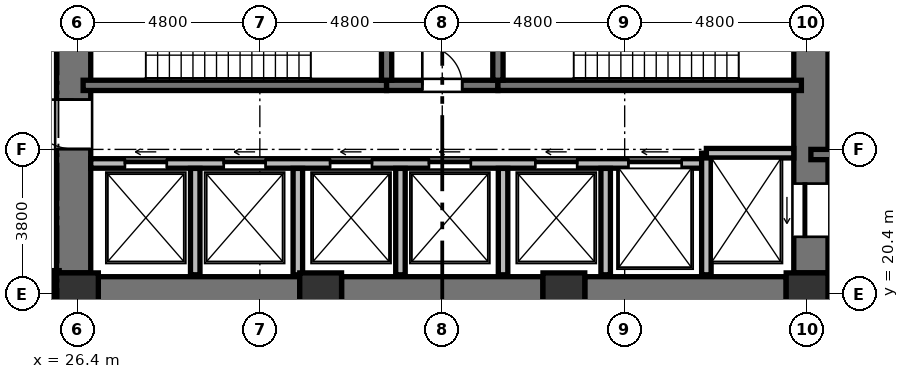
"""IFC4 building model, lengths in metres.
Left out: names, types, materials, properties, quantities, classifications, styles, units other than length and angle.
Written with IfcOpenShell. Run it as: python <this file> out.ifc"""

import sys

from ifc_helpers import new_model, si_unit, direction, frame, frame_2d, origin, origin_2d, place, context, subcontext, project, spatial, rectangle, extrude, element, fill, save


model = new_model("IFC4")
c1 = context("Model", 3, precision=1e-05, world=origin(), true_north=direction((0.0, 1.0)))
c2 = subcontext(c1, "Body", "Model", "MODEL_VIEW")
j1 = project(units=[si_unit("LENGTHUNIT", "METRE"), si_unit("PLANEANGLEUNIT", "RADIAN")], contexts=[c1])
p1 = place(None, origin())
s1 = spatial("IfcSite", under=j1, at=p1, CompositionType="ELEMENT")
p2 = place(p1, origin())
s2 = spatial("IfcBuilding", under=s1, at=p2, CompositionType="ELEMENT")
p3 = place(p2, frame((0.0, 0.0, 6.0)))
s3 = spatial("IfcBuildingStorey", under=s2, at=p3, CompositionType="ELEMENT", Elevation=6.0)
for number, where, z_axis, x_axis in (
    (1, (26.4, 20.4, 0.0), (0.0, 0.0, 1.0), (1.0, 0.0, 0.0)),
    (2, (32.8, 20.4, 0.0), (0.0, 0.0, 1.0), (1.0, 0.0, 0.0)),
    (3, (39.2, 20.4, 0.0), (0.0, 0.0, 1.0), (1.0, 0.0, 0.0)),
    (4, (45.6, 20.4, 0.0), (0.0, 0.0, 1.0), (1.0, 0.0, 0.0)),
):
    element("IfcColumn", number, at=place(p3, frame(where, z_axis=z_axis, x_axis=x_axis)), inside=s3, PredefinedType="COLUMN", context=c2, shape_type="SweptSolid", body=[
        extrude(rectangle(XDim=1.1, YDim=1.1, at=origin_2d()), origin(), (0.0, 0.0, 1.0), 4.8),
    ])
p4 = place(p3, frame((26.3, 20.95, 0.0), z_axis=(0.0, 0.0, 1.0), x_axis=(0.0, 1.0, 0.0)))
e5 = element("IfcWall", 5, at=p4, inside=s3, PredefinedType="SHEAR", context=c2, shape_type="SweptSolid", body=[
    extrude(rectangle(XDim=14.1, YDim=0.9, at=frame_2d((7.05, 0.0))), origin(), (0.0, 0.0, 1.0), 4.8),
])
p5 = place(p4, frame((6.5, 0.0, 0.0)))
e6 = element("IfcOpeningElement", 6, at=p5, cuts=e5, PredefinedType="OPENING", context=c2, shape_type="SweptSolid", body=[
    extrude(rectangle(XDim=1.2, YDim=2.15, at=frame_2d((0.6, 1.075))), frame((0.0, 0.46, 0.0), z_axis=(0.0, -1.0, 0.0), x_axis=(1.0, 0.0, 0.0)), (0.0, 0.0, 1.0), 0.92),
])
p6 = place(p4, frame((9.6, 0.0, 0.0)))
e7 = element("IfcOpeningElement", 7, at=p6, cuts=e5, PredefinedType="OPENING", context=c2, shape_type="SweptSolid", body=[
    extrude(rectangle(XDim=1.3, YDim=2.2, at=frame_2d((0.65, 1.1))), frame((0.0, 0.46, 0.0), z_axis=(0.0, -1.0, 0.0), x_axis=(1.0, 0.0, 0.0)), (0.0, 0.0, 1.0), 0.92),
])
p7 = place(p4, frame((3.26, 0.0, 0.0)))
e8 = element("IfcOpeningElement", 8, at=p7, cuts=e5, PredefinedType="OPENING", context=c2, shape_type="SweptSolid", body=[
    extrude(rectangle(XDim=1.3, YDim=2.2, at=frame_2d((0.65, 1.1))), frame((0.0, 0.46, 0.0), z_axis=(0.0, -1.0, 0.0), x_axis=(1.0, 0.0, 0.0)), (0.0, 0.0, 1.0), 0.92),
])
p8 = place(p3, frame((45.7, 20.95, 0.0), z_axis=(0.0, 0.0, 1.0), x_axis=(0.0, 1.0, 0.0)))
e9 = element("IfcWall", 9, at=p8, inside=s3, PredefinedType="SHEAR", context=c2, shape_type="SweptSolid", body=[
    extrude(rectangle(XDim=14.1, YDim=0.9, at=frame_2d((7.05, 0.0))), origin(), (0.0, 0.0, 1.0), 4.8),
])
p9 = place(p8, frame((11.75, 0.0, 0.0)))
e10 = element("IfcOpeningElement", 10, at=p9, cuts=e9, PredefinedType="OPENING", context=c2, shape_type="SweptSolid", body=[
    extrude(rectangle(XDim=1.4, YDim=2.3, at=frame_2d((0.7, 1.15))), frame((0.0, 0.46, 0.0), z_axis=(0.0, -1.0, 0.0), x_axis=(1.0, 0.0, 0.0)), (0.0, 0.0, 1.0), 0.92),
])
p10 = place(p8, frame((0.95, 0.0, 0.0)))
e11 = element("IfcOpeningElement", 11, at=p10, cuts=e9, PredefinedType="OPENING", context=c2, shape_type="SweptSolid", body=[
    extrude(rectangle(XDim=1.4, YDim=2.3, at=frame_2d((0.7, 1.15))), frame((0.0, 0.46, 0.0), z_axis=(0.0, -1.0, 0.0), x_axis=(1.0, 0.0, 0.0)), (0.0, 0.0, 1.0), 0.92),
])
p11 = place(p3, frame((26.95, 20.4, 0.0), z_axis=(0.0, 0.0, 1.0), x_axis=(1.0, 0.0, 0.0)))
e12 = element("IfcWall", 12, at=p11, inside=s3, PredefinedType="SHEAR", context=c2, shape_type="SweptSolid", body=[
    extrude(rectangle(XDim=5.3, YDim=0.9, at=frame_2d((2.65, 0.0))), origin(), (0.0, 0.0, 1.0), 4.8),
])
p12 = place(p3, frame((33.35, 20.4, 0.0), z_axis=(0.0, 0.0, 1.0), x_axis=(1.0, 0.0, 0.0)))
e13 = element("IfcWall", 13, at=p12, inside=s3, PredefinedType="SHEAR", context=c2, shape_type="SweptSolid", body=[
    extrude(rectangle(XDim=5.3, YDim=0.9, at=frame_2d((2.65, 0.0))), origin(), (0.0, 0.0, 1.0), 4.8),
])
p13 = place(p3, frame((39.75, 20.4, 0.0), z_axis=(0.0, 0.0, 1.0), x_axis=(1.0, 0.0, 0.0)))
e14 = element("IfcWall", 14, at=p13, inside=s3, PredefinedType="SHEAR", context=c2, shape_type="SweptSolid", body=[
    extrude(rectangle(XDim=5.3, YDim=0.9, at=frame_2d((2.65, 0.0))), origin(), (0.0, 0.0, 1.0), 4.8),
])
p14 = place(p3, frame((26.55, 25.885, 0.0), z_axis=(0.0, 0.0, 1.0), x_axis=(1.0, 0.0, 0.0)))
e15 = element("IfcWall", 15, at=p14, inside=s3, PredefinedType="SHEAR", context=c2, shape_type="SweptSolid", body=[
    extrude(rectangle(XDim=7.985, YDim=0.27, at=frame_2d((3.992, 0.0))), origin(), (0.0, 0.0, 1.0), 4.8),
])
p15 = place(p3, frame((34.535, 25.885, 0.0), z_axis=(0.0, 0.0, 1.0), x_axis=(1.0, 0.0, 0.0)))
e16 = element("IfcWall", 16, at=p15, inside=s3, PredefinedType="SHEAR", context=c2, shape_type="SweptSolid", body=[
    extrude(rectangle(XDim=2.93, YDim=0.27, at=frame_2d((1.465, 0.0))), origin(), (0.0, 0.0, 1.0), 4.8),
])
p16 = place(p15, frame((0.94, 0.0, 0.0)))
e17 = element("IfcOpeningElement", 17, at=p16, cuts=e16, PredefinedType="OPENING", context=c2, shape_type="SweptSolid", body=[
    extrude(rectangle(XDim=1.05, YDim=2.15, at=frame_2d((0.525, 1.075))), frame((0.0, 0.145, 0.0), z_axis=(0.0, -1.0, 0.0), x_axis=(1.0, 0.0, 0.0)), (0.0, 0.0, 1.0), 0.29),
])
p17 = place(p3, frame((37.465, 25.885, 0.0), z_axis=(0.0, 0.0, 1.0), x_axis=(1.0, 0.0, 0.0)))
e18 = element("IfcWall", 18, at=p17, inside=s3, PredefinedType="SHEAR", context=c2, shape_type="SweptSolid", body=[
    extrude(rectangle(XDim=7.985, YDim=0.27, at=frame_2d((3.992, 0.0))), origin(), (0.0, 0.0, 1.0), 4.8),
])
for number, where, z_axis, x_axis in (
    (19, (34.535, 26.02, 0.0), (0.0, 0.0, 1.0), (0.0, 1.0, 0.0)),
    (20, (37.465, 26.02, 0.0), (0.0, 0.0, 1.0), (0.0, 1.0, 0.0)),
):
    element("IfcWall", number, at=place(p3, frame(where, z_axis=z_axis, x_axis=x_axis)), inside=s3, PredefinedType="SHEAR", context=c2, shape_type="SweptSolid", body=[
        extrude(rectangle(XDim=4.08, YDim=0.27, at=frame_2d((2.04, 0.0))), origin(), (0.0, 0.0, 1.0), 4.8),
    ])
p18 = place(p3, frame((26.75, 23.83, 0.0), z_axis=(0.0, 0.0, 1.0), x_axis=(1.0, 0.0, 0.0)))
e21 = element("IfcWall", 21, at=p18, inside=s3, PredefinedType="SOLIDWALL", context=c2, shape_type="SweptSolid", body=[
    extrude(rectangle(XDim=16.2, YDim=0.25, at=frame_2d((8.1, 0.0))), origin(), (0.0, 0.0, 1.0), 4.52),
])
p19 = place(p18, frame((0.9, 0.0, 0.0)))
e22 = element("IfcOpeningElement", 22, at=p19, cuts=e21, PredefinedType="OPENING", context=c2, shape_type="SweptSolid", body=[
    extrude(rectangle(XDim=1.1, YDim=2.2, at=frame_2d((0.55, 1.1))), frame((0.0, 0.135, 0.0), z_axis=(0.0, -1.0, 0.0), x_axis=(1.0, 0.0, 0.0)), (0.0, 0.0, 1.0), 0.27),
])
p20 = place(p18, frame((3.5, 0.0, 0.0)))
e23 = element("IfcOpeningElement", 23, at=p20, cuts=e21, PredefinedType="OPENING", context=c2, shape_type="SweptSolid", body=[
    extrude(rectangle(XDim=1.1, YDim=2.2, at=frame_2d((0.55, 1.1))), frame((0.0, 0.135, 0.0), z_axis=(0.0, -1.0, 0.0), x_axis=(1.0, 0.0, 0.0)), (0.0, 0.0, 1.0), 0.27),
])
p21 = place(p18, frame((6.3, 0.0, 0.0)))
e24 = element("IfcOpeningElement", 24, at=p21, cuts=e21, PredefinedType="OPENING", context=c2, shape_type="SweptSolid", body=[
    extrude(rectangle(XDim=1.1, YDim=2.2, at=frame_2d((0.55, 1.1))), frame((0.0, 0.135, 0.0), z_axis=(0.0, -1.0, 0.0), x_axis=(1.0, 0.0, 0.0)), (0.0, 0.0, 1.0), 0.27),
])
p22 = place(p18, frame((8.9, 0.0, 0.0)))
e25 = element("IfcOpeningElement", 25, at=p22, cuts=e21, PredefinedType="OPENING", context=c2, shape_type="SweptSolid", body=[
    extrude(rectangle(XDim=1.1, YDim=2.2, at=frame_2d((0.55, 1.1))), frame((0.0, 0.135, 0.0), z_axis=(0.0, -1.0, 0.0), x_axis=(1.0, 0.0, 0.0)), (0.0, 0.0, 1.0), 0.27),
])
p23 = place(p18, frame((11.7, 0.0, 0.0)))
e26 = element("IfcOpeningElement", 26, at=p23, cuts=e21, PredefinedType="OPENING", context=c2, shape_type="SweptSolid", body=[
    extrude(rectangle(XDim=1.1, YDim=2.2, at=frame_2d((0.55, 1.1))), frame((0.0, 0.135, 0.0), z_axis=(0.0, -1.0, 0.0), x_axis=(1.0, 0.0, 0.0)), (0.0, 0.0, 1.0), 0.27),
])
p24 = place(p18, frame((14.15, 0.0, 0.0)))
e27 = element("IfcOpeningElement", 27, at=p24, cuts=e21, PredefinedType="OPENING", context=c2, shape_type="SweptSolid", body=[
    extrude(rectangle(XDim=1.4, YDim=2.3, at=frame_2d((0.7, 1.15))), frame((0.0, 0.135, 0.0), z_axis=(0.0, -1.0, 0.0), x_axis=(1.0, 0.0, 0.0)), (0.0, 0.0, 1.0), 0.27),
])
p25 = place(p3, frame((42.95, 20.9, 0.0), z_axis=(0.0, 0.0, 1.0), x_axis=(0.0, 1.0, 0.0)))
e28 = element("IfcWall", 28, at=p25, inside=s3, PredefinedType="SOLIDWALL", context=c2, shape_type="SweptSolid", body=[
    extrude(rectangle(XDim=3.2, YDim=0.25, at=frame_2d((1.6, 0.0))), origin(), (0.0, 0.0, 1.0), 4.52),
])
p26 = place(p3, frame((42.95, 24.1, 0.0), z_axis=(0.0, 0.0, 1.0), x_axis=(1.0, 0.0, 0.0)))
e29 = element("IfcWall", 29, at=p26, inside=s3, PredefinedType="SOLIDWALL", context=c2, shape_type="SweptSolid", body=[
    extrude(rectangle(XDim=2.3, YDim=0.25, at=frame_2d((1.15, 0.0))), origin(), (0.0, 0.0, 1.0), 4.52),
])
for number, where, z_axis, x_axis in (
    (30, (29.5, 20.9, 0.0), (0.0, 0.0, 1.0), (0.0, 1.0, 0.0)),
    (31, (32.2, 20.9, 0.0), (0.0, 0.0, 1.0), (0.0, 1.0, 0.0)),
    (32, (34.9, 20.9, 0.0), (0.0, 0.0, 1.0), (0.0, 1.0, 0.0)),
    (33, (37.6, 20.9, 0.0), (0.0, 0.0, 1.0), (0.0, 1.0, 0.0)),
    (34, (40.3, 20.9, 0.0), (0.0, 0.0, 1.0), (0.0, 1.0, 0.0)),
):
    element("IfcWall", number, at=place(p3, frame(where, z_axis=z_axis, x_axis=x_axis)), inside=s3, PredefinedType="SOLIDWALL", context=c2, shape_type="SweptSolid", body=[
        extrude(rectangle(XDim=2.8, YDim=0.25, at=frame_2d((1.4, 0.0))), origin(), (0.0, 0.0, 1.0), 4.52),
    ])
p27 = place(p3, frame((45.7, 24.065, 0.0), z_axis=(0.0, 0.0, 1.0), x_axis=(1.0, 0.0, 0.0)))
e35 = element("IfcWall", 35, at=p27, inside=s3, PredefinedType="SHEAR", context=c2, shape_type="SweptSolid", body=[
    extrude(rectangle(XDim=4.715, YDim=0.27, at=frame_2d((2.357, 0.0))), origin(), (0.0, 0.0, 1.0), 4.8),
])
p28 = place(p3, frame((25.83, 21.01, 0.0), z_axis=(0.0, 0.0, 1.0), x_axis=(0.0, -1.0, 0.0)))
e36 = element("IfcWall", 36, at=p28, inside=s3, PredefinedType="PARTITIONING", context=c2, shape_type="SweptSolid", body=[
    extrude(rectangle(XDim=1.22, YDim=0.18, at=frame_2d((0.61, 0.0))), origin(), (0.0, 0.0, 1.0), 4.52),
])
p29 = place(p16, origin())
e37 = element("IfcDoor", 37, at=p29, inside=s3, OperationType="SINGLE_SWING_LEFT", PredefinedType="DOOR", context=c2, shape_type="SweptSolid", body=[
    extrude(rectangle(XDim=1.05, YDim=2.15, at=frame_2d((0.525, 1.075))), frame((0.0, 0.025, 0.0), z_axis=(0.0, -1.0, 0.0), x_axis=(1.0, 0.0, 0.0)), (0.0, 0.0, 1.0), 0.05),
])
fill(e17, e37)
p30 = place(p7, origin())
e38 = element("IfcDoor", 38, at=p30, inside=s3, OperationType="SINGLE_SWING_RIGHT", PredefinedType="DOOR", context=c2, shape_type="SweptSolid", body=[
    extrude(rectangle(XDim=1.3, YDim=2.2, at=frame_2d((0.65, 1.1))), frame((0.0, 0.025, 0.0), z_axis=(0.0, -1.0, 0.0), x_axis=(1.0, 0.0, 0.0)), (0.0, 0.0, 1.0), 0.05),
])
fill(e8, e38)
p31 = place(p19, origin())
e39 = element("IfcDoor", 39, at=p31, inside=s3, OperationType="SLIDING_TO_LEFT", PredefinedType="DOOR", context=c2, shape_type="SweptSolid", body=[
    extrude(rectangle(XDim=1.1, YDim=2.2, at=frame_2d((0.55, 1.1))), frame((0.0, 0.025, 0.0), z_axis=(0.0, -1.0, 0.0), x_axis=(1.0, 0.0, 0.0)), (0.0, 0.0, 1.0), 0.05),
])
fill(e22, e39)
p32 = place(p20, origin())
e40 = element("IfcDoor", 40, at=p32, inside=s3, OperationType="SLIDING_TO_LEFT", PredefinedType="DOOR", context=c2, shape_type="SweptSolid", body=[
    extrude(rectangle(XDim=1.1, YDim=2.2, at=frame_2d((0.55, 1.1))), frame((0.0, 0.025, 0.0), z_axis=(0.0, -1.0, 0.0), x_axis=(1.0, 0.0, 0.0)), (0.0, 0.0, 1.0), 0.05),
])
fill(e23, e40)
p33 = place(p21, origin())
e41 = element("IfcDoor", 41, at=p33, inside=s3, OperationType="SLIDING_TO_LEFT", PredefinedType="DOOR", context=c2, shape_type="SweptSolid", body=[
    extrude(rectangle(XDim=1.1, YDim=2.2, at=frame_2d((0.55, 1.1))), frame((0.0, 0.025, 0.0), z_axis=(0.0, -1.0, 0.0), x_axis=(1.0, 0.0, 0.0)), (0.0, 0.0, 1.0), 0.05),
])
fill(e24, e41)
p34 = place(p22, origin())
e42 = element("IfcDoor", 42, at=p34, inside=s3, OperationType="SLIDING_TO_LEFT", PredefinedType="DOOR", context=c2, shape_type="SweptSolid", body=[
    extrude(rectangle(XDim=1.1, YDim=2.2, at=frame_2d((0.55, 1.1))), frame((0.0, 0.025, 0.0), z_axis=(0.0, -1.0, 0.0), x_axis=(1.0, 0.0, 0.0)), (0.0, 0.0, 1.0), 0.05),
])
fill(e25, e42)
p35 = place(p23, origin())
e43 = element("IfcDoor", 43, at=p35, inside=s3, OperationType="SLIDING_TO_LEFT", PredefinedType="DOOR", context=c2, shape_type="SweptSolid", body=[
    extrude(rectangle(XDim=1.1, YDim=2.2, at=frame_2d((0.55, 1.1))), frame((0.0, 0.025, 0.0), z_axis=(0.0, -1.0, 0.0), x_axis=(1.0, 0.0, 0.0)), (0.0, 0.0, 1.0), 0.05),
])
fill(e26, e43)
p36 = place(p10, origin())
e44 = element("IfcDoor", 44, at=p36, inside=s3, OperationType="SLIDING_TO_LEFT", PredefinedType="DOOR", context=c2, shape_type="SweptSolid", body=[
    extrude(rectangle(XDim=1.4, YDim=2.3, at=frame_2d((0.7, 1.15))), frame((0.0, 0.025, 0.0), z_axis=(0.0, -1.0, 0.0), x_axis=(1.0, 0.0, 0.0)), (0.0, 0.0, 1.0), 0.05),
])
fill(e11, e44)
p37 = place(p24, origin())
e45 = element("IfcDoor", 45, at=p37, inside=s3, OperationType="SLIDING_TO_LEFT", PredefinedType="DOOR", context=c2, shape_type="SweptSolid", body=[
    extrude(rectangle(XDim=1.4, YDim=2.3, at=frame_2d((0.7, 1.15))), frame((0.0, 0.025, 0.0), z_axis=(0.0, -1.0, 0.0), x_axis=(1.0, 0.0, 0.0)), (0.0, 0.0, 1.0), 0.05),
])
fill(e27, e45)
save(model, sys.argv[1])
